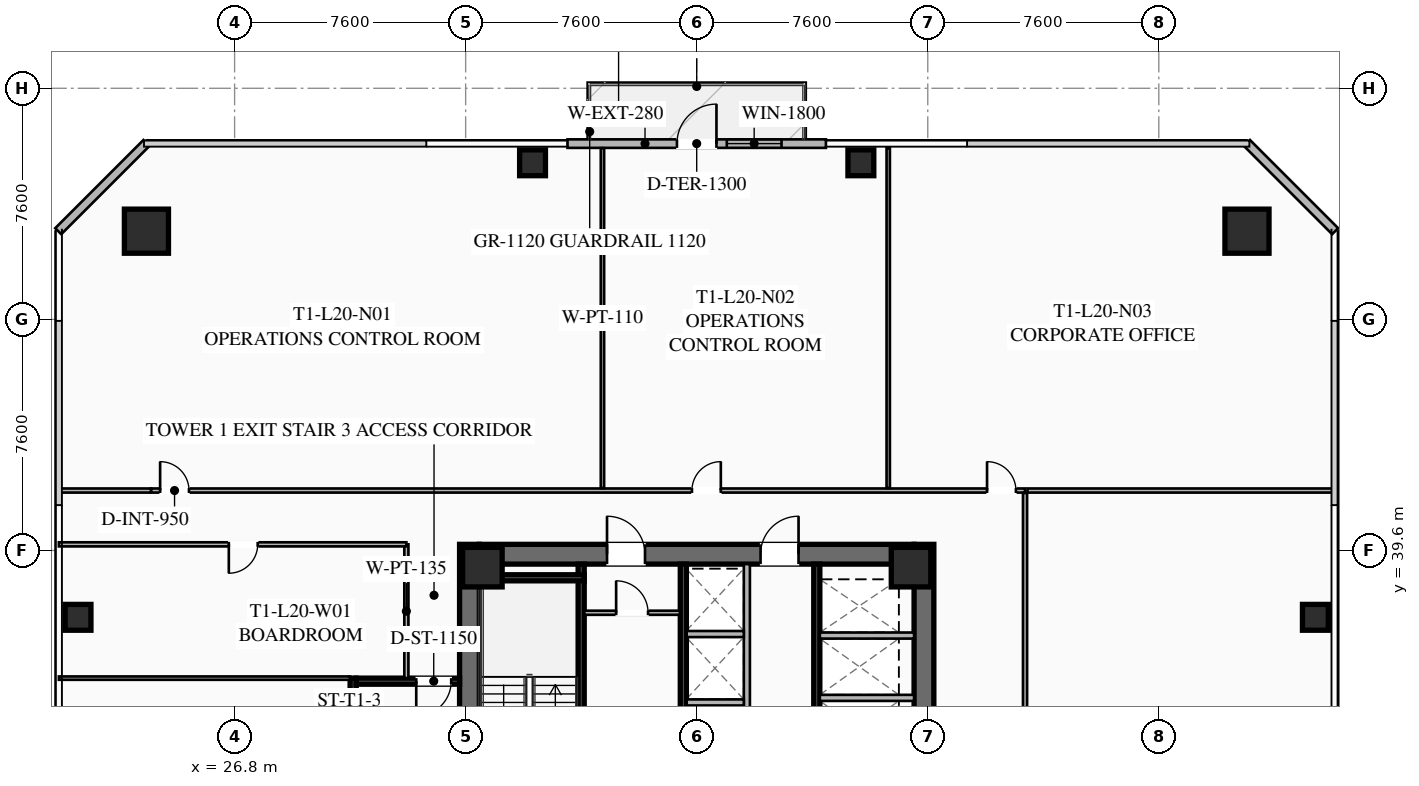
"""IFC4 building model, lengths in metres.
Left out: names, types, materials, properties, quantities, classifications, styles, units other than length and angle.
Written with IfcOpenShell. Run it as: python <this file> out.ifc"""

import sys

from ifc_helpers import new_model, si_unit, direction, frame, frame_2d, origin, origin_2d, place, context, subcontext, project, spatial, rectangle, hollow_rectangle, extrude, element, fill, save


model = new_model("IFC4")
c1 = context("Model", 3, precision=1e-05, world=origin(), true_north=direction((0.0, 1.0)))
c2 = subcontext(c1, "Body", "Model", "MODEL_VIEW")
j1 = project(units=[si_unit("LENGTHUNIT", "METRE"), si_unit("PLANEANGLEUNIT", "RADIAN")], contexts=[c1])
p1 = place(None, origin())
s1 = spatial("IfcSite", under=j1, at=p1, CompositionType="ELEMENT")
p2 = place(p1, origin())
s2 = spatial("IfcBuilding", under=s1, at=p2, CompositionType="ELEMENT")
p3 = place(p2, frame((0.0, 0.0, 77.85)))
s3 = spatial("IfcBuildingStorey", under=s2, at=p3, CompositionType="ELEMENT", Elevation=77.85)
for number, where, z_axis, x_axis in (
    (1, (34.525, 24.2, 0.0), (0.0, 0.0, 1.0), (0.0, 1.0, 0.0)),
    (2, (49.475, 39.8, 0.0), (0.0, 0.0, 1.0), (0.0, -1.0, 0.0)),
):
    element("IfcWall", number, at=place(p3, frame(where, z_axis=z_axis, x_axis=x_axis)), inside=s3, PredefinedType="SHEAR", context=c2, shape_type="SweptSolid", body=[
        extrude(rectangle(XDim=15.6, YDim=0.65, at=frame_2d((7.8, 0.0))), origin(), (0.0, 0.0, 1.0), 3.55),
    ])
p4 = place(p3, frame((34.85, 39.475, 0.0), z_axis=(0.0, 0.0, 1.0), x_axis=(1.0, 0.0, 0.0)))
e3 = element("IfcWall", 3, at=p4, inside=s3, PredefinedType="SHEAR", context=c2, shape_type="SweptSolid", body=[
    extrude(rectangle(XDim=14.3, YDim=0.65, at=frame_2d((7.15, 0.0))), origin(), (0.0, 0.0, 1.0), 3.55),
])
p5 = place(p4, frame((4.2, 0.0, 0.0)))
e4 = element("IfcOpeningElement", 4, at=p5, cuts=e3, PredefinedType="OPENING", context=c2, shape_type="SweptSolid", body=[
    extrude(rectangle(XDim=1.25, YDim=2.25, at=frame_2d((0.625, 1.125))), frame((0.0, 0.335, 0.0), z_axis=(0.0, -1.0, 0.0), x_axis=(1.0, 0.0, 0.0)), (0.0, 0.0, 1.0), 0.67),
])
p6 = place(p4, frame((9.25, 0.0, 0.0)))
e5 = element("IfcOpeningElement", 5, at=p6, cuts=e3, PredefinedType="OPENING", context=c2, shape_type="SweptSolid", body=[
    extrude(rectangle(XDim=1.25, YDim=2.25, at=frame_2d((0.625, 1.125))), frame((0.0, 0.335, 0.0), z_axis=(0.0, -1.0, 0.0), x_axis=(1.0, 0.0, 0.0)), (0.0, 0.0, 1.0), 0.67),
])
for number, where, z_axis, x_axis in (
    (6, (49.05, 39.05, 0.0), (0.0, 0.0, 1.0), (1.0, 0.0, 0.0)),
    (7, (34.95, 39.05, 0.0), (0.0, 0.0, 1.0), (1.0, 0.0, 0.0)),
):
    element("IfcColumn", number, at=place(p3, frame(where, z_axis=z_axis, x_axis=x_axis)), inside=s3, PredefinedType="COLUMN", context=c2, shape_type="SweptSolid", body=[
        extrude(hollow_rectangle(XDim=1.3, YDim=1.3, WallThickness=0.05, at=origin_2d()), origin(), (0.0, 0.0, 1.0), 3.35),
    ])
for number, where, z_axis, x_axis in (
    (8, (60.1, 50.1, 0.0), (0.0, 0.0, 1.0), (1.0, 0.0, 0.0)),
    (9, (23.9, 50.1, 0.0), (0.0, 0.0, 1.0), (1.0, 0.0, 0.0)),
):
    element("IfcColumn", number, at=place(p3, frame(where, z_axis=z_axis, x_axis=x_axis)), inside=s3, PredefinedType="COLUMN", context=c2, shape_type="SweptSolid", body=[
        extrude(hollow_rectangle(XDim=1.45, YDim=1.45, WallThickness=0.055, at=origin_2d()), origin(), (0.0, 0.0, 1.0), 3.35),
    ])
for number, where, z_axis, x_axis in (
    (10, (62.35, 37.4, 0.0), (0.0, 0.0, 1.0), (1.0, 0.0, 0.0)),
    (11, (47.4, 52.35, 0.0), (0.0, 0.0, 1.0), (1.0, 0.0, 0.0)),
    (12, (36.6, 52.35, 0.0), (0.0, 0.0, 1.0), (1.0, 0.0, 0.0)),
    (13, (21.65, 37.4, 0.0), (0.0, 0.0, 1.0), (1.0, 0.0, 0.0)),
):
    element("IfcColumn", number, at=place(p3, frame(where, z_axis=z_axis, x_axis=x_axis)), inside=s3, PredefinedType="COLUMN", context=c2, shape_type="SweptSolid", body=[
        extrude(hollow_rectangle(XDim=0.85, YDim=0.85, WallThickness=0.035, at=origin_2d()), origin(), (0.0, 0.0, 1.0), 3.35),
    ])
p7 = place(p3, frame((37.75, 52.98, 0.0), z_axis=(0.0, 0.0, 1.0), x_axis=(1.0, 0.0, 0.0)))
e14 = element("IfcWall", 14, at=p7, inside=s3, PredefinedType="SOLIDWALL", context=c2, shape_type="SweptSolid", body=[
    extrude(rectangle(XDim=8.5, YDim=0.28, at=frame_2d((4.25, 0.0))), origin(), (0.0, 0.0, 1.0), 3.35),
])
p8 = place(p7, frame((3.6, 0.0, 0.0)))
e15 = element("IfcOpeningElement", 15, at=p8, cuts=e14, PredefinedType="OPENING", context=c2, shape_type="SweptSolid", body=[
    extrude(rectangle(XDim=1.3, YDim=2.15, at=frame_2d((0.65, 1.075))), frame((0.0, 0.15, 0.0), z_axis=(0.0, -1.0, 0.0), x_axis=(1.0, 0.0, 0.0)), (0.0, 0.0, 1.0), 0.3),
])
p9 = place(p7, frame((5.24, 0.0, 0.85)))
e16 = element("IfcOpeningElement", 16, at=p9, cuts=e14, PredefinedType="OPENING", context=c2, shape_type="SweptSolid", body=[
    extrude(rectangle(XDim=1.8, YDim=1.92, at=frame_2d((0.9, 0.96))), frame((0.0, 0.15, 0.0), z_axis=(0.0, -1.0, 0.0), x_axis=(1.0, 0.0, 0.0)), (0.0, 0.0, 1.0), 0.3),
])
for number, where, z_axis, x_axis in (
    (17, (21.0, 50.1, 0.0), (0.0, 0.0, 1.0), (0.707, 0.707, 0.0)),
    (18, (60.1, 53.0, 0.0), (0.0, 0.0, 1.0), (0.707, -0.707, 0.0)),
):
    element("IfcWall", number, at=place(p3, frame(where, z_axis=z_axis, x_axis=x_axis)), inside=s3, PredefinedType="SOLIDWALL", context=c2, shape_type="SweptSolid", body=[
        extrude(rectangle(XDim=4.101, YDim=0.28, at=frame_2d((2.051, 0.0))), origin(), (0.0, 0.0, 1.0), 3.35),
    ])
p10 = place(p3, frame((38.2, 31.2, 0.0), z_axis=(0.0, 0.0, 1.0), x_axis=(0.0, 1.0, 0.0)))
e19 = element("IfcWall", 19, at=p10, inside=s3, PredefinedType="SHEAR", context=c2, shape_type="SweptSolid", body=[
    extrude(rectangle(XDim=7.95, YDim=0.2, at=frame_2d((3.975, 0.0))), origin(), (0.0, 0.0, 1.0), 3.35),
])
p11 = place(p10, frame((0.45, 0.0, 0.0)))
e20 = element("IfcOpeningElement", 20, at=p11, cuts=e19, PredefinedType="OPENING", context=c2, shape_type="SweptSolid", body=[
    extrude(rectangle(XDim=1.15, YDim=2.2, at=frame_2d((0.575, 1.1))), frame((0.0, 0.11, 0.0), z_axis=(0.0, -1.0, 0.0), x_axis=(1.0, 0.0, 0.0)), (0.0, 0.0, 1.0), 0.22),
])
p12 = place(p3, frame((34.85, 38.7, 0.0), z_axis=(0.0, 0.0, 1.0), x_axis=(1.0, 0.0, 0.0)))
e21 = element("IfcWall", 21, at=p12, inside=s3, PredefinedType="SHEAR", context=c2, shape_type="SweptSolid", body=[
    extrude(rectangle(XDim=3.45, YDim=0.2, at=frame_2d((1.725, 0.0))), origin(), (0.0, 0.0, 1.0), 3.35),
])
p13 = place(p3, frame((41.56, 24.85, 0.0), z_axis=(0.0, 0.0, 1.0), x_axis=(0.0, 1.0, 0.0)))
e22 = element("IfcWall", 22, at=p13, inside=s3, PredefinedType="SHEAR", context=c2, shape_type="SweptSolid", body=[
    extrude(rectangle(XDim=14.3, YDim=0.2, at=frame_2d((7.15, 0.0))), origin(), (0.0, 0.0, 1.0), 3.35),
])
p14 = place(p3, frame((45.95, 39.15, 0.0), z_axis=(0.0, 0.0, 1.0), x_axis=(0.0, -1.0, 0.0)))
e23 = element("IfcWall", 23, at=p14, inside=s3, PredefinedType="SHEAR", context=c2, shape_type="SweptSolid", body=[
    extrude(rectangle(XDim=6.35, YDim=0.2, at=frame_2d((3.175, 0.0))), origin(), (0.0, 0.0, 1.0), 3.35),
])
for number, where, z_axis, x_axis in (
    (24, (46.05, 34.75, 0.0), (0.0, 0.0, 1.0), (1.0, 0.0, 0.0)),
    (25, (46.05, 36.8, 0.0), (0.0, 0.0, 1.0), (1.0, 0.0, 0.0)),
):
    element("IfcWall", number, at=place(p3, frame(where, z_axis=z_axis, x_axis=x_axis)), inside=s3, PredefinedType="SOLIDWALL", context=c2, shape_type="SweptSolid", body=[
        extrude(rectangle(XDim=3.1, YDim=0.2, at=frame_2d((1.55, 0.0))), origin(), (0.0, 0.0, 1.0), 3.35),
    ])
p15 = place(p3, frame((38.3, 37.55, 0.0), z_axis=(0.0, 0.0, 1.0), x_axis=(1.0, 0.0, 0.0)))
e26 = element("IfcWall", 26, at=p15, inside=s3, PredefinedType="PARTITIONING", context=c2, shape_type="SweptSolid", body=[
    extrude(rectangle(XDim=3.15, YDim=0.135, at=frame_2d((1.575, 0.0))), origin(), (0.0, 0.0, 1.0), 2.703),
])
p16 = place(p15, frame((1.05, 0.0, 0.0)))
e27 = element("IfcOpeningElement", 27, at=p16, cuts=e26, PredefinedType="OPENING", context=c2, shape_type="SweptSolid", body=[
    extrude(rectangle(XDim=1.05, YDim=2.2, at=frame_2d((0.525, 1.1))), frame((0.0, 0.077, 0.0), z_axis=(0.0, -1.0, 0.0), x_axis=(1.0, 0.0, 0.0)), (0.0, 0.0, 1.0), 0.155),
])
p17 = place(p3, frame((43.65, 32.35, 0.0), z_axis=(0.0, 0.0, 1.0), x_axis=(0.0, 1.0, 0.0)))
e28 = element("IfcWall", 28, at=p17, inside=s3, PredefinedType="SOLIDWALL", context=c2, shape_type="SweptSolid", body=[
    extrude(rectangle(XDim=6.8, YDim=0.2, at=frame_2d((3.4, 0.0))), origin(), (0.0, 0.0, 1.0), 3.35),
])
for number, where, z_axis, x_axis in (
    (29, (41.67, 34.6, 0.0), (0.0, 0.0, 1.0), (1.0, 0.0, 0.0)),
    (30, (41.67, 36.85, 0.0), (0.0, 0.0, 1.0), (1.0, 0.0, 0.0)),
):
    element("IfcWall", number, at=place(p3, frame(where, z_axis=z_axis, x_axis=x_axis)), inside=s3, PredefinedType="SOLIDWALL", context=c2, shape_type="SweptSolid", body=[
        extrude(rectangle(XDim=1.88, YDim=0.2, at=frame_2d((0.94, 0.0))), origin(), (0.0, 0.0, 1.0), 3.35),
    ])
p18 = place(p3, frame((30.7, 28.6, 0.0), z_axis=(0.0, 0.0, 1.0), x_axis=(0.0, 1.0, 0.0)))
e31 = element("IfcWall", 31, at=p18, inside=s3, PredefinedType="SHEAR", context=c2, shape_type="SweptSolid", body=[
    extrude(rectangle(XDim=6.8, YDim=0.2, at=frame_2d((3.4, 0.0))), origin(), (0.0, 0.0, 1.0), 3.35),
])
p19 = place(p3, frame((34.2, 35.3, 0.0), z_axis=(0.0, 0.0, 1.0), x_axis=(-1.0, 0.0, 0.0)))
e32 = element("IfcWall", 32, at=p19, inside=s3, PredefinedType="SHEAR", context=c2, shape_type="SweptSolid", body=[
    extrude(rectangle(XDim=3.4, YDim=0.2, at=frame_2d((1.7, 0.0))), origin(), (0.0, 0.0, 1.0), 3.35),
])
p20 = place(p19, frame((0.275, 0.0, 0.0)))
e33 = element("IfcOpeningElement", 33, at=p20, cuts=e32, PredefinedType="OPENING", context=c2, shape_type="SweptSolid", body=[
    extrude(rectangle(XDim=1.15, YDim=2.2, at=frame_2d((0.575, 1.1))), frame((0.0, 0.11, 0.0), z_axis=(0.0, -1.0, 0.0), x_axis=(1.0, 0.0, 0.0)), (0.0, 0.0, 1.0), 0.22),
])
p21 = place(p3, frame((32.45, 35.4, 0.0), z_axis=(0.0, 0.0, 1.0), x_axis=(0.0, 1.0, 0.0)))
e34 = element("IfcWall", 34, at=p21, inside=s3, PredefinedType="PARTITIONING", context=c2, shape_type="SweptSolid", body=[
    extrude(rectangle(XDim=4.4, YDim=0.135, at=frame_2d((2.2, 0.0))), origin(), (0.0, 0.0, 1.0), 2.703),
])
p22 = place(p3, frame((24.05, 41.57, 0.0), z_axis=(0.0, 0.0, 1.0), x_axis=(1.0, 0.0, 0.0)))
e35 = element("IfcWall", 35, at=p22, inside=s3, PredefinedType="PARTITIONING", context=c2, shape_type="SweptSolid", body=[
    extrude(rectangle(XDim=28.75, YDim=0.135, at=frame_2d((14.375, 0.0))), origin(), (0.0, 0.0, 1.0), 2.703),
])
p23 = place(p22, frame((0.3, 0.0, 0.0)))
e36 = element("IfcOpeningElement", 36, at=p23, cuts=e35, PredefinedType="OPENING", context=c2, shape_type="SweptSolid", body=[
    extrude(rectangle(XDim=0.95, YDim=2.05, at=frame_2d((0.475, 1.025))), frame((0.0, 0.077, 0.0), z_axis=(0.0, -1.0, 0.0), x_axis=(1.0, 0.0, 0.0)), (0.0, 0.0, 1.0), 0.155),
])
p24 = place(p22, frame((17.793, 0.0, 0.0)))
e37 = element("IfcOpeningElement", 37, at=p24, cuts=e35, PredefinedType="OPENING", context=c2, shape_type="SweptSolid", body=[
    extrude(rectangle(XDim=0.95, YDim=2.05, at=frame_2d((0.475, 1.025))), frame((0.0, 0.077, 0.0), z_axis=(0.0, -1.0, 0.0), x_axis=(1.0, 0.0, 0.0)), (0.0, 0.0, 1.0), 0.155),
])
p25 = place(p22, frame((27.5, 0.0, 0.0)))
e38 = element("IfcOpeningElement", 38, at=p25, cuts=e35, PredefinedType="OPENING", context=c2, shape_type="SweptSolid", body=[
    extrude(rectangle(XDim=0.95, YDim=2.05, at=frame_2d((0.475, 1.025))), frame((0.0, 0.077, 0.0), z_axis=(0.0, -1.0, 0.0), x_axis=(1.0, 0.0, 0.0)), (0.0, 0.0, 1.0), 0.155),
])
p26 = place(p3, frame((21.02, 41.57, 0.0), z_axis=(0.0, 0.0, 1.0), x_axis=(1.0, 0.0, 0.0)))
e39 = element("IfcWall", 39, at=p26, inside=s3, PredefinedType="PARTITIONING", context=c2, shape_type="SweptSolid", body=[
    extrude(rectangle(XDim=3.03, YDim=0.135, at=frame_2d((1.515, 0.0))), origin(), (0.0, 0.0, 1.0), 2.703),
])
for number, where, z_axis, x_axis in (
    (40, (38.9, 41.65, 0.0), (0.0, 0.0, 1.0), (0.0, 1.0, 0.0)),
    (41, (48.3, 41.65, 0.0), (0.0, 0.0, 1.0), (0.0, 1.0, 0.0)),
):
    element("IfcWall", number, at=place(p3, frame(where, z_axis=z_axis, x_axis=x_axis)), inside=s3, PredefinedType="PARTITIONING", context=c2, shape_type="SweptSolid", body=[
        extrude(rectangle(XDim=11.18, YDim=0.11, at=frame_2d((5.59, 0.0))), origin(), (0.0, 0.0, 1.0), 2.703),
    ])
p27 = place(p3, frame((52.8, 41.49, 0.0), z_axis=(0.0, 0.0, 1.0), x_axis=(0.0, -1.0, 0.0)))
e42 = element("IfcWall", 42, at=p27, inside=s3, PredefinedType="PARTITIONING", context=c2, shape_type="SweptSolid", body=[
    extrude(rectangle(XDim=20.36, YDim=0.135, at=frame_2d((10.18, 0.0))), origin(), (0.0, 0.0, 1.0), 2.703),
])
p28 = place(p27, frame((19.11, 0.0, 0.0)))
e43 = element("IfcOpeningElement", 43, at=p28, cuts=e42, PredefinedType="OPENING", context=c2, shape_type="SweptSolid", body=[
    extrude(rectangle(XDim=0.95, YDim=2.05, at=frame_2d((0.475, 1.025))), frame((0.0, 0.077, 0.0), z_axis=(0.0, -1.0, 0.0), x_axis=(1.0, 0.0, 0.0)), (0.0, 0.0, 1.0), 0.155),
])
p29 = place(p3, frame((62.98, 41.57, 0.0), z_axis=(0.0, 0.0, 1.0), x_axis=(-1.0, 0.0, 0.0)))
e44 = element("IfcWall", 44, at=p29, inside=s3, PredefinedType="PARTITIONING", context=c2, shape_type="SweptSolid", body=[
    extrude(rectangle(XDim=10.1, YDim=0.135, at=frame_2d((5.05, 0.0))), origin(), (0.0, 0.0, 1.0), 2.703),
])
p30 = place(p3, frame((32.45, 39.8, 0.0), z_axis=(0.0, 0.0, 1.0), x_axis=(-1.0, 0.0, 0.0)))
e45 = element("IfcWall", 45, at=p30, inside=s3, PredefinedType="PARTITIONING", context=c2, shape_type="SweptSolid", body=[
    extrude(rectangle(XDim=11.43, YDim=0.135, at=frame_2d((5.715, 0.0))), origin(), (0.0, 0.0, 1.0), 2.703),
])
p31 = place(p30, frame((4.89, 0.0, 0.0)))
e46 = element("IfcOpeningElement", 46, at=p31, cuts=e45, PredefinedType="OPENING", context=c2, shape_type="SweptSolid", body=[
    extrude(rectangle(XDim=0.95, YDim=2.05, at=frame_2d((0.475, 1.025))), frame((0.0, 0.077, 0.0), z_axis=(0.0, -1.0, 0.0), x_axis=(1.0, 0.0, 0.0)), (0.0, 0.0, 1.0), 0.155),
])
p32 = place(p3, frame((30.6, 35.4, 0.0), z_axis=(0.0, 0.0, 1.0), x_axis=(-1.0, 0.0, 0.0)))
e47 = element("IfcWall", 47, at=p32, inside=s3, PredefinedType="PARTITIONING", context=c2, shape_type="SweptSolid", body=[
    extrude(rectangle(XDim=9.58, YDim=0.11, at=frame_2d((4.79, 0.0))), origin(), (0.0, 0.0, 1.0), 2.703),
])
p33 = place(p8, origin())
e48 = element("IfcDoor", 48, at=p33, inside=s3, OperationType="SINGLE_SWING_RIGHT", PredefinedType="DOOR", context=c2, shape_type="SweptSolid", body=[
    extrude(rectangle(XDim=1.3, YDim=2.15, at=frame_2d((0.65, 1.075))), frame((0.0, 0.025, 0.0), z_axis=(0.0, -1.0, 0.0), x_axis=(1.0, 0.0, 0.0)), (0.0, 0.0, 1.0), 0.05),
])
fill(e15, e48)
p34 = place(p9, origin())
e49 = element("IfcWindow", 49, at=p34, inside=s3, PartitioningType="SINGLE_PANEL", PredefinedType="WINDOW", context=c2, shape_type="SweptSolid", body=[
    extrude(rectangle(XDim=1.8, YDim=1.92, at=frame_2d((0.9, 0.96))), frame((0.0, 0.03, 0.0), z_axis=(0.0, -1.0, 0.0), x_axis=(1.0, 0.0, 0.0)), (0.0, 0.0, 1.0), 0.06),
])
fill(e16, e49)
p35 = place(p5, origin())
e50 = element("IfcDoor", 50, at=p35, inside=s3, OperationType="SINGLE_SWING_LEFT", PredefinedType="DOOR", context=c2, shape_type="SweptSolid", body=[
    extrude(rectangle(XDim=1.25, YDim=2.25, at=frame_2d((0.625, 1.125))), frame((0.0, 0.025, 0.0), z_axis=(0.0, -1.0, 0.0), x_axis=(1.0, 0.0, 0.0)), (0.0, 0.0, 1.0), 0.05),
])
fill(e4, e50)
p36 = place(p6, origin())
e51 = element("IfcDoor", 51, at=p36, inside=s3, OperationType="SINGLE_SWING_RIGHT", PredefinedType="DOOR", context=c2, shape_type="SweptSolid", body=[
    extrude(rectangle(XDim=1.25, YDim=2.25, at=frame_2d((0.625, 1.125))), frame((0.0, 0.025, 0.0), z_axis=(0.0, -1.0, 0.0), x_axis=(1.0, 0.0, 0.0)), (0.0, 0.0, 1.0), 0.05),
])
fill(e5, e51)
p37 = place(p16, origin())
e52 = element("IfcDoor", 52, at=p37, inside=s3, OperationType="SINGLE_SWING_LEFT", PredefinedType="DOOR", context=c2, shape_type="SweptSolid", body=[
    extrude(rectangle(XDim=1.05, YDim=2.2, at=frame_2d((0.525, 1.1))), frame((0.0, 0.025, 0.0), z_axis=(0.0, -1.0, 0.0), x_axis=(1.0, 0.0, 0.0)), (0.0, 0.0, 1.0), 0.05),
])
fill(e27, e52)
p38 = place(p20, origin())
e53 = element("IfcDoor", 53, at=p38, inside=s3, OperationType="SINGLE_SWING_RIGHT", PredefinedType="DOOR", context=c2, shape_type="SweptSolid", body=[
    extrude(rectangle(XDim=1.15, YDim=2.2, at=frame_2d((0.575, 1.1))), frame((0.0, 0.025, 0.0), z_axis=(0.0, -1.0, 0.0), x_axis=(1.0, 0.0, 0.0)), (0.0, 0.0, 1.0), 0.05),
])
fill(e33, e53)
p39 = place(p23, origin())
e54 = element("IfcDoor", 54, at=p39, inside=s3, OperationType="SINGLE_SWING_LEFT", PredefinedType="DOOR", context=c2, shape_type="SweptSolid", body=[
    extrude(rectangle(XDim=0.95, YDim=2.05, at=frame_2d((0.475, 1.025))), frame((0.0, 0.025, 0.0), z_axis=(0.0, -1.0, 0.0), x_axis=(1.0, 0.0, 0.0)), (0.0, 0.0, 1.0), 0.05),
])
fill(e36, e54)
p40 = place(p24, origin())
e55 = element("IfcDoor", 55, at=p40, inside=s3, OperationType="SINGLE_SWING_RIGHT", PredefinedType="DOOR", context=c2, shape_type="SweptSolid", body=[
    extrude(rectangle(XDim=0.95, YDim=2.05, at=frame_2d((0.475, 1.025))), frame((0.0, 0.025, 0.0), z_axis=(0.0, -1.0, 0.0), x_axis=(1.0, 0.0, 0.0)), (0.0, 0.0, 1.0), 0.05),
])
fill(e37, e55)
p41 = place(p25, origin())
e56 = element("IfcDoor", 56, at=p41, inside=s3, OperationType="SINGLE_SWING_LEFT", PredefinedType="DOOR", context=c2, shape_type="SweptSolid", body=[
    extrude(rectangle(XDim=0.95, YDim=2.05, at=frame_2d((0.475, 1.025))), frame((0.0, 0.025, 0.0), z_axis=(0.0, -1.0, 0.0), x_axis=(1.0, 0.0, 0.0)), (0.0, 0.0, 1.0), 0.05),
])
fill(e38, e56)
p42 = place(p31, origin())
e57 = element("IfcDoor", 57, at=p42, inside=s3, OperationType="SINGLE_SWING_RIGHT", PredefinedType="DOOR", context=c2, shape_type="SweptSolid", body=[
    extrude(rectangle(XDim=0.95, YDim=2.05, at=frame_2d((0.475, 1.025))), frame((0.0, 0.025, 0.0), z_axis=(0.0, -1.0, 0.0), x_axis=(1.0, 0.0, 0.0)), (0.0, 0.0, 1.0), 0.05),
])
fill(e46, e57)
save(model, sys.argv[1])
